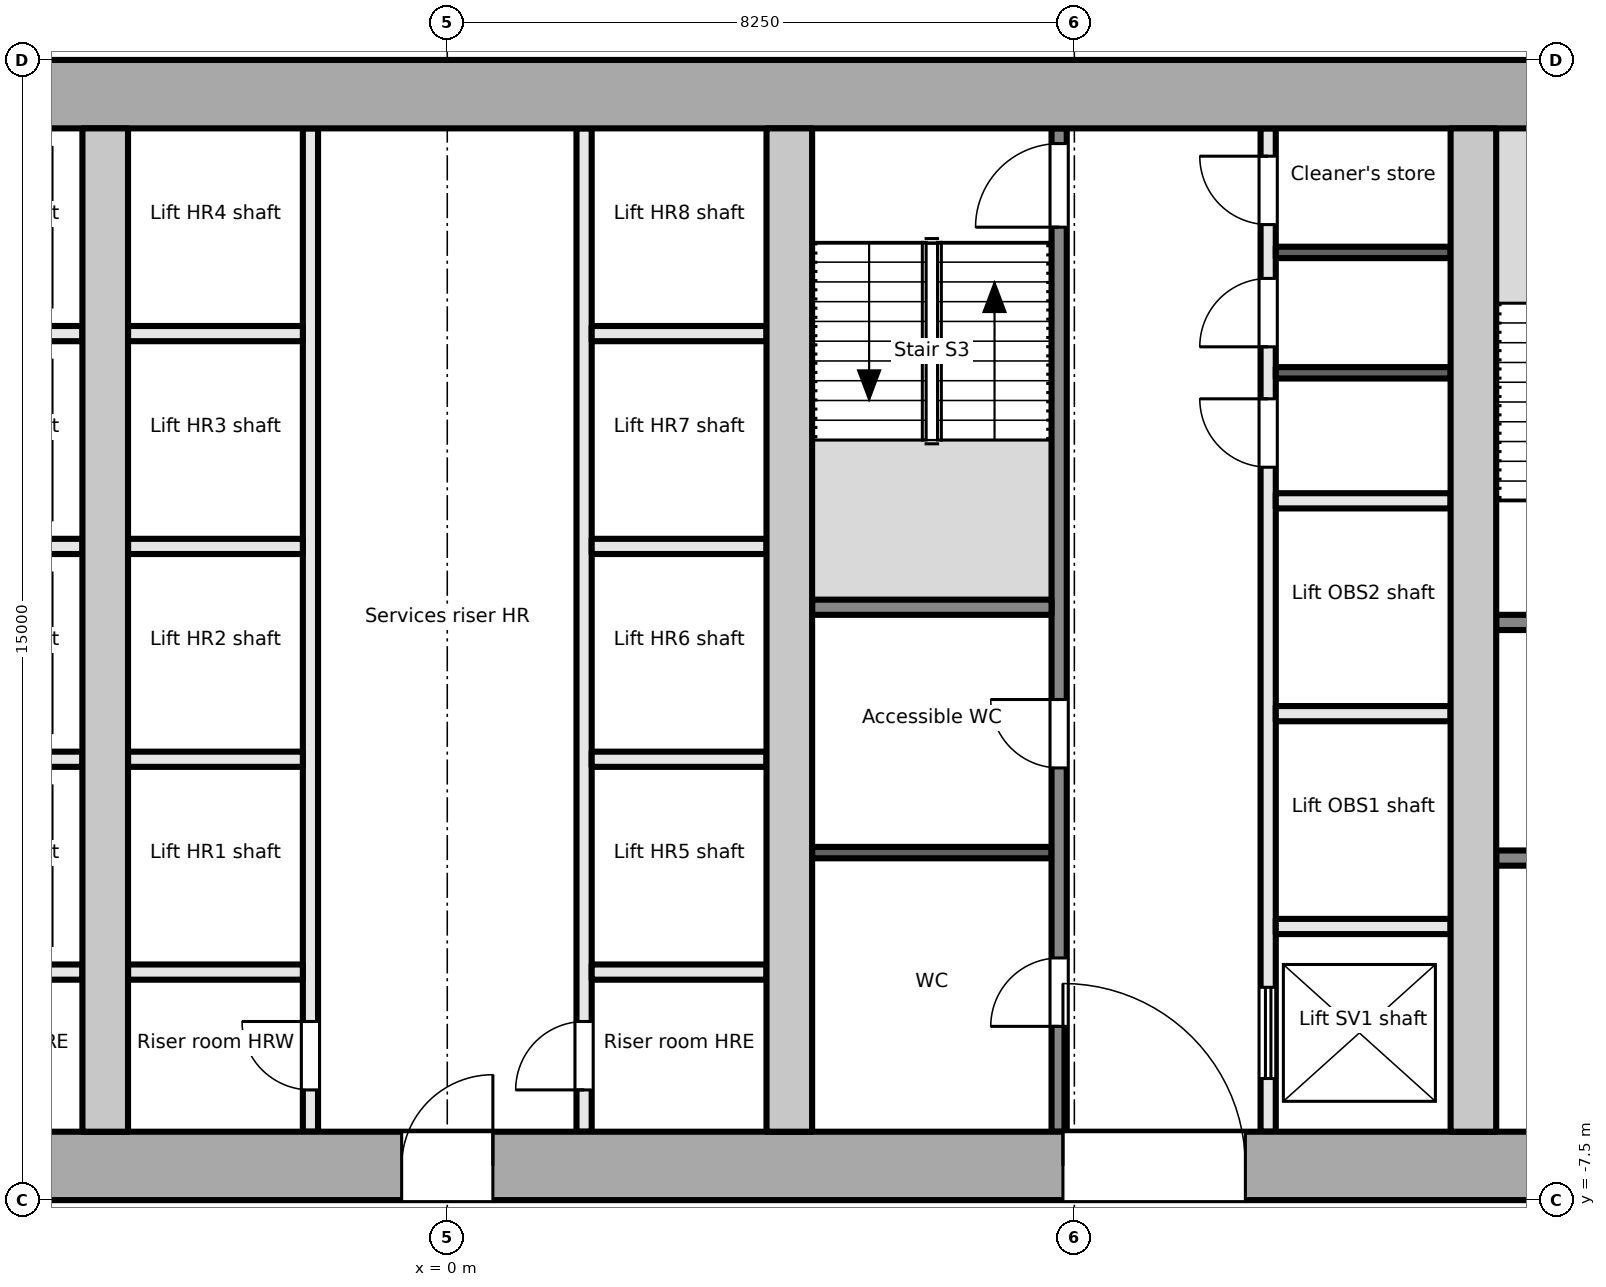
"""IFC4 building model, lengths in metres.
Left out: names, types, materials, properties, quantities, classifications, styles, units other than length and angle.
Written with IfcOpenShell. Run it as: python <this file> out.ifc"""

import sys

from ifc_helpers import new_model, si_unit, direction, frame, frame_2d, origin, place, context, subcontext, project, spatial, rectangle, extrude, element, fill, save


model = new_model("IFC4")
c1 = context("Model", 3, precision=1e-05, world=origin(), true_north=direction((0.0, 1.0)))
c2 = subcontext(c1, "Body", "Model", "MODEL_VIEW")
j1 = project(units=[si_unit("LENGTHUNIT", "METRE"), si_unit("PLANEANGLEUNIT", "RADIAN")], contexts=[c1])
p1 = place(None, origin())
s1 = spatial("IfcSite", under=j1, at=p1, CompositionType="ELEMENT")
p2 = place(p1, origin())
s2 = spatial("IfcBuilding", under=s1, at=p2, CompositionType="ELEMENT")
p3 = place(p2, frame((0.0, 0.0, 40.6)))
s3 = spatial("IfcBuildingStorey", under=s2, at=p3, CompositionType="ELEMENT", Elevation=40.6)
p4 = place(p3, frame((-18.0, -7.05, -0.2), z_axis=(0.0, 0.0, 1.0), x_axis=(1.0, 0.0, 0.0)))
e1 = element("IfcWall", 1, at=p4, inside=s3, PredefinedType="SHEAR", context=c2, shape_type="SweptSolid", body=[
    extrude(rectangle(XDim=36.0, YDim=0.9, at=frame_2d((18.0, 0.0))), origin(), (0.0, 0.0, 1.0), 4.1),
])
p5 = place(p4, frame((7.8, 0.0, 0.2)))
e2 = element("IfcOpeningElement", 2, at=p5, cuts=e1, PredefinedType="OPENING", context=c2, shape_type="SweptSolid", body=[
    extrude(rectangle(XDim=2.4, YDim=2.1, at=frame_2d((1.2, 1.05))), frame((0.0, 0.46, 0.0), z_axis=(0.0, -1.0, 0.0), x_axis=(1.0, 0.0, 0.0)), (0.0, 0.0, 1.0), 0.921),
])
p6 = place(p4, frame((17.4, 0.0, 0.2)))
e3 = element("IfcOpeningElement", 3, at=p6, cuts=e1, PredefinedType="OPENING", context=c2, shape_type="SweptSolid", body=[
    extrude(rectangle(XDim=1.2, YDim=2.1, at=frame_2d((0.6, 1.05))), frame((0.0, 0.46, 0.0), z_axis=(0.0, -1.0, 0.0), x_axis=(1.0, 0.0, 0.0)), (0.0, 0.0, 1.0), 0.921),
])
p7 = place(p4, frame((26.1, 0.0, 0.2)))
e4 = element("IfcOpeningElement", 4, at=p7, cuts=e1, PredefinedType="OPENING", context=c2, shape_type="SweptSolid", body=[
    extrude(rectangle(XDim=2.4, YDim=2.1, at=frame_2d((1.2, 1.05))), frame((0.0, 0.46, 0.0), z_axis=(0.0, -1.0, 0.0), x_axis=(1.0, 0.0, 0.0)), (0.0, 0.0, 1.0), 0.921),
])
p8 = place(p3, frame((-18.0, 7.05, -0.2), z_axis=(0.0, 0.0, 1.0), x_axis=(1.0, 0.0, 0.0)))
e5 = element("IfcWall", 5, at=p8, inside=s3, PredefinedType="SHEAR", context=c2, shape_type="SweptSolid", body=[
    extrude(rectangle(XDim=36.0, YDim=0.9, at=frame_2d((18.0, 0.0))), origin(), (0.0, 0.0, 1.0), 4.1),
])
for number, where, z_axis, x_axis in (
    (6, (-4.5, -6.6, -0.2), (0.0, 0.0, 1.0), (0.0, 1.0, 0.0)),
    (7, (4.5, -6.6, -0.2), (0.0, 0.0, 1.0), (0.0, 1.0, 0.0)),
    (8, (13.5, -6.6, -0.2), (0.0, 0.0, 1.0), (0.0, 1.0, 0.0)),
):
    element("IfcWall", number, at=place(p3, frame(where, z_axis=z_axis, x_axis=x_axis)), inside=s3, PredefinedType="SHEAR", context=c2, shape_type="SweptSolid", body=[
        extrude(rectangle(XDim=13.2, YDim=0.6, at=frame_2d((6.6, 0.0))), origin(), (0.0, 0.0, 1.0), 4.1),
    ])
p9 = place(p3, frame((13.8, -3.0, 0.0), z_axis=(0.0, 0.0, 1.0), x_axis=(1.0, 0.0, 0.0)))
e9 = element("IfcWall", 9, at=p9, inside=s3, PredefinedType="PARTITIONING", context=c2, shape_type="SweptSolid", body=[
    extrude(rectangle(XDim=3.3, YDim=0.2, at=frame_2d((1.65, 0.0))), origin(), (0.0, 0.0, 1.0), 3.9),
])
p10 = place(p9, frame((1.1, 0.0, 0.0)))
e10 = element("IfcOpeningElement", 10, at=p10, cuts=e9, PredefinedType="OPENING", context=c2, shape_type="SweptSolid", body=[
    extrude(rectangle(XDim=1.1, YDim=2.1, at=frame_2d((0.55, 1.05))), frame((0.0, 0.111, 0.0), z_axis=(0.0, -1.0, 0.0), x_axis=(1.0, 0.0, 0.0)), (0.0, 0.0, 1.0), 0.221),
])
p11 = place(p3, frame((13.8, 0.1, 0.0), z_axis=(0.0, 0.0, 1.0), x_axis=(1.0, 0.0, 0.0)))
e11 = element("IfcWall", 11, at=p11, inside=s3, PredefinedType="PARTITIONING", context=c2, shape_type="SweptSolid", body=[
    extrude(rectangle(XDim=3.3, YDim=0.2, at=frame_2d((1.65, 0.0))), origin(), (0.0, 0.0, 1.0), 3.9),
])
p12 = place(p11, frame((1.1, 0.0, 0.0)))
e12 = element("IfcOpeningElement", 12, at=p12, cuts=e11, PredefinedType="OPENING", context=c2, shape_type="SweptSolid", body=[
    extrude(rectangle(XDim=1.1, YDim=2.1, at=frame_2d((0.55, 1.05))), frame((0.0, 0.111, 0.0), z_axis=(0.0, -1.0, 0.0), x_axis=(1.0, 0.0, 0.0)), (0.0, 0.0, 1.0), 0.221),
])
for number, where, z_axis, x_axis in (
    (13, (-7.1, -1.7, 0.0), (0.0, 0.0, 1.0), (1.0, 0.0, 0.0)),
    (14, (-7.1, 1.1, 0.0), (0.0, 0.0, 1.0), (1.0, 0.0, 0.0)),
    (15, (-7.1, 3.9, 0.0), (0.0, 0.0, 1.0), (1.0, 0.0, 0.0)),
    (16, (-7.1, -4.5, 0.0), (0.0, 0.0, 1.0), (1.0, 0.0, 0.0)),
):
    element("IfcWall", number, at=place(p3, frame(where, z_axis=z_axis, x_axis=x_axis)), inside=s3, PredefinedType="PARTITIONING", context=c2, shape_type="SweptSolid", body=[
        extrude(rectangle(XDim=2.3, YDim=0.2, at=frame_2d((1.15, 0.0))), origin(), (0.0, 0.0, 1.0), 3.9),
    ])
p13 = place(p3, frame((-1.8, -6.6, 0.0), z_axis=(0.0, 0.0, 1.0), x_axis=(0.0, 1.0, 0.0)))
e17 = element("IfcWall", 17, at=p13, inside=s3, PredefinedType="PARTITIONING", context=c2, shape_type="SweptSolid", body=[
    extrude(rectangle(XDim=13.2, YDim=0.2, at=frame_2d((6.6, 0.0))), origin(), (0.0, 0.0, 1.0), 3.9),
])
p14 = place(p13, frame((0.55, 0.0, 0.0)))
e18 = element("IfcOpeningElement", 18, at=p14, cuts=e17, PredefinedType="OPENING", context=c2, shape_type="SweptSolid", body=[
    extrude(rectangle(XDim=0.9, YDim=2.1, at=frame_2d((0.45, 1.05))), frame((0.0, 0.111, 0.0), z_axis=(0.0, -1.0, 0.0), x_axis=(1.0, 0.0, 0.0)), (0.0, 0.0, 1.0), 0.221),
])
p15 = place(p3, frame((1.8, -6.6, 0.0), z_axis=(0.0, 0.0, 1.0), x_axis=(0.0, 1.0, 0.0)))
e19 = element("IfcWall", 19, at=p15, inside=s3, PredefinedType="PARTITIONING", context=c2, shape_type="SweptSolid", body=[
    extrude(rectangle(XDim=13.2, YDim=0.2, at=frame_2d((6.6, 0.0))), origin(), (0.0, 0.0, 1.0), 3.9),
])
p16 = place(p15, frame((0.55, 0.0, 0.0)))
e20 = element("IfcOpeningElement", 20, at=p16, cuts=e19, PredefinedType="OPENING", context=c2, shape_type="SweptSolid", body=[
    extrude(rectangle(XDim=0.9, YDim=2.1, at=frame_2d((0.45, 1.05))), frame((0.0, 0.111, 0.0), z_axis=(0.0, -1.0, 0.0), x_axis=(1.0, 0.0, 0.0)), (0.0, 0.0, 1.0), 0.221),
])
for number, where, z_axis, x_axis in (
    (21, (-4.2, -1.7, 0.0), (0.0, 0.0, 1.0), (1.0, 0.0, 0.0)),
    (22, (-4.2, 1.1, 0.0), (0.0, 0.0, 1.0), (1.0, 0.0, 0.0)),
    (23, (-4.2, 3.9, 0.0), (0.0, 0.0, 1.0), (1.0, 0.0, 0.0)),
    (24, (-4.2, -4.5, 0.0), (0.0, 0.0, 1.0), (1.0, 0.0, 0.0)),
    (25, (1.9, -1.7, 0.0), (0.0, 0.0, 1.0), (1.0, 0.0, 0.0)),
    (26, (1.9, 1.1, 0.0), (0.0, 0.0, 1.0), (1.0, 0.0, 0.0)),
    (27, (1.9, 3.9, 0.0), (0.0, 0.0, 1.0), (1.0, 0.0, 0.0)),
    (28, (1.9, -4.5, 0.0), (0.0, 0.0, 1.0), (1.0, 0.0, 0.0)),
):
    element("IfcWall", number, at=place(p3, frame(where, z_axis=z_axis, x_axis=x_axis)), inside=s3, PredefinedType="PARTITIONING", context=c2, shape_type="SweptSolid", body=[
        extrude(rectangle(XDim=2.3, YDim=0.2, at=frame_2d((1.15, 0.0))), origin(), (0.0, 0.0, 1.0), 3.9),
    ])
p17 = place(p3, frame((8.05, -6.6, 0.0), z_axis=(0.0, 0.0, 1.0), x_axis=(0.0, 1.0, 0.0)))
e29 = element("IfcWall", 29, at=p17, inside=s3, PredefinedType="PARTITIONING", context=c2, shape_type="SweptSolid", body=[
    extrude(rectangle(XDim=13.2, YDim=0.2, at=frame_2d((6.6, 0.0))), origin(), (0.0, 0.0, 1.0), 3.9),
])
p18 = place(p17, frame((1.386, 0.0, 0.0)))
e30 = element("IfcOpeningElement", 30, at=p18, cuts=e29, PredefinedType="OPENING", context=c2, shape_type="SweptSolid", body=[
    extrude(rectangle(XDim=0.9, YDim=2.1, at=frame_2d((0.45, 1.05))), frame((0.0, 0.111, 0.0), z_axis=(0.0, -1.0, 0.0), x_axis=(1.0, 0.0, 0.0)), (0.0, 0.0, 1.0), 0.221),
])
p19 = place(p17, frame((4.786, 0.0, 0.0)))
e31 = element("IfcOpeningElement", 31, at=p19, cuts=e29, PredefinedType="OPENING", context=c2, shape_type="SweptSolid", body=[
    extrude(rectangle(XDim=0.9, YDim=2.1, at=frame_2d((0.45, 1.05))), frame((0.0, 0.111, 0.0), z_axis=(0.0, -1.0, 0.0), x_axis=(1.0, 0.0, 0.0)), (0.0, 0.0, 1.0), 0.221),
])
p20 = place(p17, frame((11.9, 0.0, 0.0)))
e32 = element("IfcOpeningElement", 32, at=p20, cuts=e29, PredefinedType="OPENING", context=c2, shape_type="SweptSolid", body=[
    extrude(rectangle(XDim=1.1, YDim=2.1, at=frame_2d((0.55, 1.05))), frame((0.0, 0.111, 0.0), z_axis=(0.0, -1.0, 0.0), x_axis=(1.0, 0.0, 0.0)), (0.0, 0.0, 1.0), 0.221),
])
p21 = place(p3, frame((10.8, -6.6, 0.0), z_axis=(0.0, 0.0, 1.0), x_axis=(0.0, 1.0, 0.0)))
e33 = element("IfcWall", 33, at=p21, inside=s3, PredefinedType="PARTITIONING", context=c2, shape_type="SweptSolid", body=[
    extrude(rectangle(XDim=13.2, YDim=0.2, at=frame_2d((6.6, 0.0))), origin(), (0.0, 0.0, 1.0), 3.9),
])
p22 = place(p21, frame((0.7, 0.0, 0.0)))
e34 = element("IfcOpeningElement", 34, at=p22, cuts=e33, PredefinedType="OPENING", context=c2, shape_type="SweptSolid", body=[
    extrude(rectangle(XDim=1.2, YDim=2.1, at=frame_2d((0.6, 1.05))), frame((0.0, 0.111, 0.0), z_axis=(0.0, -1.0, 0.0), x_axis=(1.0, 0.0, 0.0)), (0.0, 0.0, 1.0), 0.221),
])
p23 = place(p21, frame((8.742, 0.0, 0.0)))
e35 = element("IfcOpeningElement", 35, at=p23, cuts=e33, PredefinedType="OPENING", context=c2, shape_type="SweptSolid", body=[
    extrude(rectangle(XDim=0.9, YDim=2.1, at=frame_2d((0.45, 1.05))), frame((0.0, 0.111, 0.0), z_axis=(0.0, -1.0, 0.0), x_axis=(1.0, 0.0, 0.0)), (0.0, 0.0, 1.0), 0.221),
])
p24 = place(p21, frame((10.326, 0.0, 0.0)))
e36 = element("IfcOpeningElement", 36, at=p24, cuts=e33, PredefinedType="OPENING", context=c2, shape_type="SweptSolid", body=[
    extrude(rectangle(XDim=0.9, YDim=2.1, at=frame_2d((0.45, 1.05))), frame((0.0, 0.111, 0.0), z_axis=(0.0, -1.0, 0.0), x_axis=(1.0, 0.0, 0.0)), (0.0, 0.0, 1.0), 0.221),
])
p25 = place(p21, frame((11.934, 0.0, 0.0)))
e37 = element("IfcOpeningElement", 37, at=p25, cuts=e33, PredefinedType="OPENING", context=c2, shape_type="SweptSolid", body=[
    extrude(rectangle(XDim=0.9, YDim=2.1, at=frame_2d((0.45, 1.05))), frame((0.0, 0.111, 0.0), z_axis=(0.0, -1.0, 0.0), x_axis=(1.0, 0.0, 0.0)), (0.0, 0.0, 1.0), 0.221),
])
p26 = place(p3, frame((4.8, 0.3, 0.0), z_axis=(0.0, 0.0, 1.0), x_axis=(1.0, 0.0, 0.0)))
e38 = element("IfcWall", 38, at=p26, inside=s3, PredefinedType="PARTITIONING", context=c2, shape_type="SweptSolid", body=[
    extrude(rectangle(XDim=3.15, YDim=0.2, at=frame_2d((1.575, 0.0))), origin(), (0.0, 0.0, 1.0), 3.9),
])
p27 = place(p3, frame((4.8, -2.928, 0.0), z_axis=(0.0, 0.0, 1.0), x_axis=(1.0, 0.0, 0.0)))
e39 = element("IfcWall", 39, at=p27, inside=s3, PredefinedType="PARTITIONING", context=c2, shape_type="SweptSolid", body=[
    extrude(rectangle(XDim=3.15, YDim=0.15, at=frame_2d((1.575, 0.0))), origin(), (0.0, 0.0, 1.0), 3.9),
])
for number, where, z_axis, x_axis in (
    (40, (10.9, -3.9, 0.0), (0.0, 0.0, 1.0), (1.0, 0.0, 0.0)),
    (41, (10.9, -1.1, 0.0), (0.0, 0.0, 1.0), (1.0, 0.0, 0.0)),
    (42, (10.9, 1.7, 0.0), (0.0, 0.0, 1.0), (1.0, 0.0, 0.0)),
):
    element("IfcWall", number, at=place(p3, frame(where, z_axis=z_axis, x_axis=x_axis)), inside=s3, PredefinedType="PARTITIONING", context=c2, shape_type="SweptSolid", body=[
        extrude(rectangle(XDim=2.3, YDim=0.2, at=frame_2d((1.15, 0.0))), origin(), (0.0, 0.0, 1.0), 3.9),
    ])
for number, where, z_axis, x_axis in (
    (43, (10.9, 3.384, 0.0), (0.0, 0.0, 1.0), (1.0, 0.0, 0.0)),
    (44, (10.9, 4.968, 0.0), (0.0, 0.0, 1.0), (1.0, 0.0, 0.0)),
):
    element("IfcWall", number, at=place(p3, frame(where, z_axis=z_axis, x_axis=x_axis)), inside=s3, PredefinedType="PARTITIONING", context=c2, shape_type="SweptSolid", body=[
        extrude(rectangle(XDim=2.3, YDim=0.15, at=frame_2d((1.15, 0.0))), origin(), (0.0, 0.0, 1.0), 3.9),
    ])
p28 = place(p14, origin())
e45 = element("IfcDoor", 45, at=p28, inside=s3, OperationType="SINGLE_SWING_RIGHT", PredefinedType="DOOR", context=c2, shape_type="SweptSolid", body=[
    extrude(rectangle(XDim=0.9, YDim=2.1, at=frame_2d((0.45, 1.05))), frame((0.0, 0.025, 0.0), z_axis=(0.0, -1.0, 0.0), x_axis=(1.0, 0.0, 0.0)), (0.0, 0.0, 1.0), 0.05),
])
fill(e18, e45)
p29 = place(p16, origin())
e46 = element("IfcDoor", 46, at=p29, inside=s3, OperationType="SINGLE_SWING_LEFT", PredefinedType="DOOR", context=c2, shape_type="SweptSolid", body=[
    extrude(rectangle(XDim=0.9, YDim=2.1, at=frame_2d((0.45, 1.05))), frame((0.0, 0.025, 0.0), z_axis=(0.0, -1.0, 0.0), x_axis=(1.0, 0.0, 0.0)), (0.0, 0.0, 1.0), 0.05),
])
fill(e20, e46)
p30 = place(p6, origin())
e47 = element("IfcDoor", 47, at=p30, inside=s3, OperationType="SINGLE_SWING_RIGHT", PredefinedType="DOOR", context=c2, shape_type="SweptSolid", body=[
    extrude(rectangle(XDim=1.2, YDim=2.1, at=frame_2d((0.6, 1.05))), frame((0.0, 0.025, 0.0), z_axis=(0.0, -1.0, 0.0), x_axis=(1.0, 0.0, 0.0)), (0.0, 0.0, 1.0), 0.05),
])
fill(e3, e47)
p31 = place(p18, origin())
e48 = element("IfcDoor", 48, at=p31, inside=s3, OperationType="SINGLE_SWING_LEFT", PredefinedType="DOOR", context=c2, shape_type="SweptSolid", body=[
    extrude(rectangle(XDim=0.9, YDim=2.1, at=frame_2d((0.45, 1.05))), frame((0.0, 0.025, 0.0), z_axis=(0.0, -1.0, 0.0), x_axis=(1.0, 0.0, 0.0)), (0.0, 0.0, 1.0), 0.05),
])
fill(e30, e48)
p32 = place(p19, origin())
e49 = element("IfcDoor", 49, at=p32, inside=s3, OperationType="SINGLE_SWING_RIGHT", PredefinedType="DOOR", context=c2, shape_type="SweptSolid", body=[
    extrude(rectangle(XDim=0.9, YDim=2.1, at=frame_2d((0.45, 1.05))), frame((0.0, 0.025, 0.0), z_axis=(0.0, -1.0, 0.0), x_axis=(1.0, 0.0, 0.0)), (0.0, 0.0, 1.0), 0.05),
])
fill(e31, e49)
p33 = place(p20, origin())
e50 = element("IfcDoor", 50, at=p33, inside=s3, OperationType="SINGLE_SWING_LEFT", PredefinedType="DOOR", context=c2, shape_type="SweptSolid", body=[
    extrude(rectangle(XDim=1.1, YDim=2.1, at=frame_2d((0.55, 1.05))), frame((0.0, 0.025, 0.0), z_axis=(0.0, -1.0, 0.0), x_axis=(1.0, 0.0, 0.0)), (0.0, 0.0, 1.0), 0.05),
])
fill(e32, e50)
p34 = place(p7, origin())
e51 = element("IfcDoor", 51, at=p34, inside=s3, OperationType="DOUBLE_DOOR_DOUBLE_SWING", PredefinedType="DOOR", context=c2, shape_type="SweptSolid", body=[
    extrude(rectangle(XDim=2.4, YDim=2.1, at=frame_2d((1.2, 1.05))), frame((0.0, 0.025, 0.0), z_axis=(0.0, -1.0, 0.0), x_axis=(1.0, 0.0, 0.0)), (0.0, 0.0, 1.0), 0.05),
])
fill(e4, e51)
p35 = place(p22, origin())
e52 = element("IfcDoor", 52, at=p35, inside=s3, OperationType="DOUBLE_DOOR_SLIDING", PredefinedType="DOOR", context=c2, shape_type="SweptSolid", body=[
    extrude(rectangle(XDim=1.2, YDim=2.1, at=frame_2d((0.6, 1.05))), frame((0.0, 0.025, 0.0), z_axis=(0.0, -1.0, 0.0), x_axis=(1.0, 0.0, 0.0)), (0.0, 0.0, 1.0), 0.05),
])
fill(e34, e52)
p36 = place(p23, origin())
e53 = element("IfcDoor", 53, at=p36, inside=s3, OperationType="SINGLE_SWING_RIGHT", PredefinedType="DOOR", context=c2, shape_type="SweptSolid", body=[
    extrude(rectangle(XDim=0.9, YDim=2.1, at=frame_2d((0.45, 1.05))), frame((0.0, 0.025, 0.0), z_axis=(0.0, -1.0, 0.0), x_axis=(1.0, 0.0, 0.0)), (0.0, 0.0, 1.0), 0.05),
])
fill(e35, e53)
p37 = place(p24, origin())
e54 = element("IfcDoor", 54, at=p37, inside=s3, OperationType="SINGLE_SWING_LEFT", PredefinedType="DOOR", context=c2, shape_type="SweptSolid", body=[
    extrude(rectangle(XDim=0.9, YDim=2.1, at=frame_2d((0.45, 1.05))), frame((0.0, 0.025, 0.0), z_axis=(0.0, -1.0, 0.0), x_axis=(1.0, 0.0, 0.0)), (0.0, 0.0, 1.0), 0.05),
])
fill(e36, e54)
p38 = place(p25, origin())
e55 = element("IfcDoor", 55, at=p38, inside=s3, OperationType="SINGLE_SWING_RIGHT", PredefinedType="DOOR", context=c2, shape_type="SweptSolid", body=[
    extrude(rectangle(XDim=0.9, YDim=2.1, at=frame_2d((0.45, 1.05))), frame((0.0, 0.025, 0.0), z_axis=(0.0, -1.0, 0.0), x_axis=(1.0, 0.0, 0.0)), (0.0, 0.0, 1.0), 0.05),
])
fill(e37, e55)
save(model, sys.argv[1])
